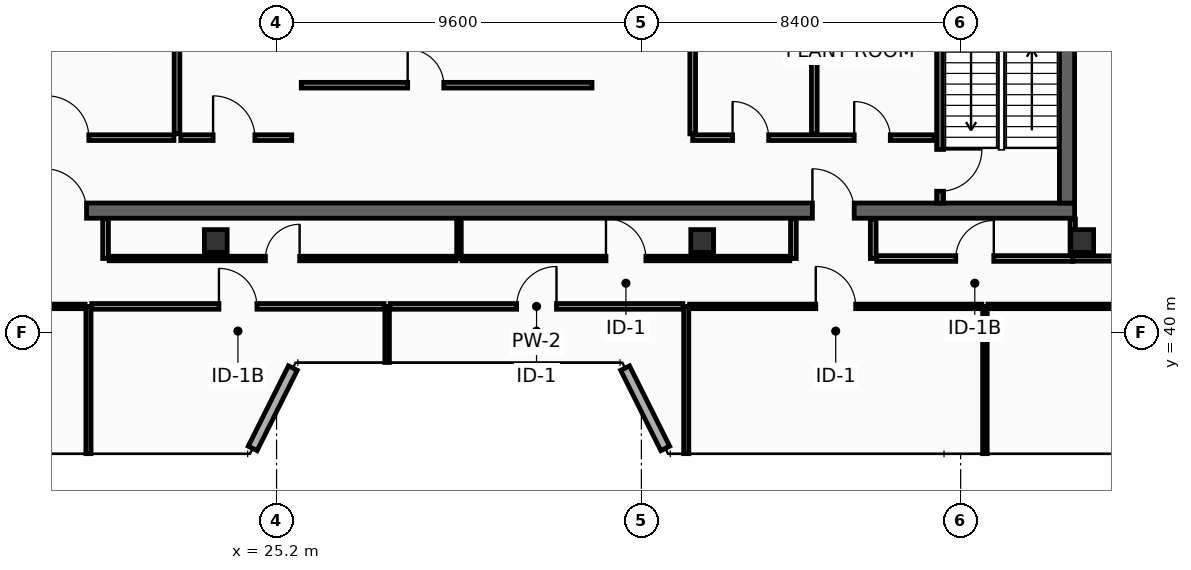
"""IFC4 building model, lengths in metres.
Left out: names, types, materials, properties, quantities, classifications, styles, units other than length and angle.
Written with IfcOpenShell. Run it as: python <this file> out.ifc"""

import sys

from ifc_helpers import new_model, si_unit, direction, frame, frame_2d, origin, origin_2d, place, context, subcontext, project, spatial, rectangle, hollow_rectangle, extrude, element, fill, save


model = new_model("IFC4")
c1 = context("Model", 3, precision=1e-05, world=origin(), true_north=direction((0.0, 1.0)))
c2 = subcontext(c1, "Body", "Model", "MODEL_VIEW")
j1 = project(units=[si_unit("LENGTHUNIT", "METRE"), si_unit("PLANEANGLEUNIT", "RADIAN")], contexts=[c1])
p1 = place(None, origin())
s1 = spatial("IfcSite", under=j1, at=p1, CompositionType="ELEMENT")
p2 = place(p1, origin())
s2 = spatial("IfcBuilding", under=s1, at=p2, CompositionType="ELEMENT")
p3 = place(p2, frame((0.0, 0.0, 319.2)))
s3 = spatial("IfcBuildingStorey", under=s2, at=p3, CompositionType="ELEMENT", Elevation=319.2)
p4 = place(p3, frame((13.7, 43.2, 0.0), z_axis=(0.0, 0.0, 1.0), x_axis=(1.0, 0.0, 0.0)))
e1 = element("IfcWall", 1, at=p4, inside=s3, PredefinedType="SHEAR", context=c2, shape_type="SweptSolid", body=[
    extrude(rectangle(XDim=32.5, YDim=0.4, at=frame_2d((16.25, 0.0))), origin(), (0.0, 0.0, 1.0), 3.95),
])
p5 = place(p4, frame((5.4, 0.0, 0.0)))
e2 = element("IfcOpeningElement", 2, at=p5, cuts=e1, PredefinedType="OPENING", context=c2, shape_type="SweptSolid", body=[
    extrude(rectangle(XDim=1.1, YDim=2.15, at=frame_2d((0.55, 1.075))), frame((0.0, 0.21, 0.0), z_axis=(0.0, -1.0, 0.0), x_axis=(1.0, 0.0, 0.0)), (0.0, 0.0, 1.0), 0.42),
])
p6 = place(p4, frame((25.6, 0.0, 0.0)))
e3 = element("IfcOpeningElement", 3, at=p6, cuts=e1, PredefinedType="OPENING", context=c2, shape_type="SweptSolid", body=[
    extrude(rectangle(XDim=1.1, YDim=2.15, at=frame_2d((0.55, 1.075))), frame((0.0, 0.21, 0.0), z_axis=(0.0, -1.0, 0.0), x_axis=(1.0, 0.0, 0.0)), (0.0, 0.0, 1.0), 0.42),
])
p7 = place(p3, frame((46.0, 43.4, 0.0), z_axis=(0.0, 0.0, 1.0), x_axis=(0.0, 1.0, 0.0)))
e4 = element("IfcWall", 4, at=p7, inside=s3, PredefinedType="SHEAR", context=c2, shape_type="SweptSolid", body=[
    extrude(rectangle(XDim=10.4, YDim=0.4, at=frame_2d((5.2, 0.0))), origin(), (0.0, 0.0, 1.0), 3.95),
])
for number, where, z_axis, x_axis in (
    (5, (23.6, 42.4, 0.0), (0.0, 0.0, 1.0), (1.0, 0.0, 0.0)),
    (6, (36.4, 42.4, 0.0), (0.0, 0.0, 1.0), (1.0, 0.0, 0.0)),
    (7, (46.4, 42.4, 0.0), (0.0, 0.0, 1.0), (1.0, 0.0, 0.0)),
):
    element("IfcColumn", number, at=place(p3, frame(where, z_axis=z_axis, x_axis=x_axis)), inside=s3, PredefinedType="COLUMN", context=c2, shape_type="SweptSolid", body=[
        extrude(hollow_rectangle(XDim=0.6, YDim=0.6, WallThickness=0.028, at=origin_2d()), origin(), (0.0, 0.0, 1.0), 4.2),
    ])
p8 = place(p3, frame((42.66, 53.8, 0.0), z_axis=(0.0, 0.0, 1.0), x_axis=(0.0, -1.0, 0.0)))
e8 = element("IfcWall", 8, at=p8, inside=s3, PredefinedType="SHEAR", context=c2, shape_type="SweptSolid", body=[
    extrude(rectangle(XDim=10.4, YDim=0.18, at=frame_2d((5.2, 0.0))), origin(), (0.0, 0.0, 1.0), 3.95),
])
p9 = place(p8, frame((8.99, 0.0, 0.0)))
e9 = element("IfcOpeningElement", 9, at=p9, cuts=e8, PredefinedType="OPENING", context=c2, shape_type="SweptSolid", body=[
    extrude(rectangle(XDim=1.1, YDim=2.15, at=frame_2d((0.55, 1.075))), frame((0.0, 0.1, 0.0), z_axis=(0.0, -1.0, 0.0), x_axis=(1.0, 0.0, 0.0)), (0.0, 0.0, 1.0), 0.2),
])
p10 = place(p3, frame((17.36, 45.12, 0.0), z_axis=(0.0, 0.0, 1.0), x_axis=(1.0, 0.0, 0.0)))
e10 = element("IfcWall", 10, at=p10, inside=s3, PredefinedType="PARTITIONING", context=c2, shape_type="SweptSolid", body=[
    extrude(rectangle(XDim=5.14, YDim=0.15, at=frame_2d((2.57, 0.0))), origin(), (0.0, 0.0, 1.0), 3.95),
])
p11 = place(p10, frame((1.8, 0.0, 0.0)))
e11 = element("IfcOpeningElement", 11, at=p11, cuts=e10, PredefinedType="OPENING", context=c2, shape_type="SweptSolid", body=[
    extrude(rectangle(XDim=1.1, YDim=2.15, at=frame_2d((0.55, 1.075))), frame((0.0, 0.085, 0.0), z_axis=(0.0, -1.0, 0.0), x_axis=(1.0, 0.0, 0.0)), (0.0, 0.0, 1.0), 0.17),
])
p12 = place(p3, frame((22.58, 50.55, 0.0), z_axis=(0.0, 0.0, 1.0), x_axis=(0.0, -1.0, 0.0)))
e12 = element("IfcWall", 12, at=p12, inside=s3, PredefinedType="PARTITIONING", context=c2, shape_type="SweptSolid", body=[
    extrude(rectangle(XDim=5.33, YDim=0.15, at=frame_2d((2.665, 0.0))), origin(), (0.0, 0.0, 1.0), 3.95),
])
p13 = place(p12, frame((1.8, 0.0, 0.0)))
e13 = element("IfcOpeningElement", 13, at=p13, cuts=e12, PredefinedType="OPENING", context=c2, shape_type="SweptSolid", body=[
    extrude(rectangle(XDim=1.1, YDim=2.15, at=frame_2d((0.55, 1.075))), frame((0.0, 0.085, 0.0), z_axis=(0.0, -1.0, 0.0), x_axis=(1.0, 0.0, 0.0)), (0.0, 0.0, 1.0), 0.17),
])
p14 = place(p3, frame((22.68, 45.12, 0.0), z_axis=(0.0, 0.0, 1.0), x_axis=(1.0, 0.0, 0.0)))
e14 = element("IfcWall", 14, at=p14, inside=s3, PredefinedType="PARTITIONING", context=c2, shape_type="SweptSolid", body=[
    extrude(rectangle(XDim=2.92, YDim=0.15, at=frame_2d((1.46, 0.0))), origin(), (0.0, 0.0, 1.0), 3.95),
])
p15 = place(p14, frame((0.85, 0.0, 0.0)))
e15 = element("IfcOpeningElement", 15, at=p15, cuts=e14, PredefinedType="OPENING", context=c2, shape_type="SweptSolid", body=[
    extrude(rectangle(XDim=1.1, YDim=2.15, at=frame_2d((0.55, 1.075))), frame((0.0, 0.085, 0.0), z_axis=(0.0, -1.0, 0.0), x_axis=(1.0, 0.0, 0.0)), (0.0, 0.0, 1.0), 0.17),
])
p16 = place(p3, frame((36.15, 45.12, 0.0), z_axis=(0.0, 0.0, 1.0), x_axis=(1.0, 0.0, 0.0)))
e16 = element("IfcWall", 16, at=p16, inside=s3, PredefinedType="PARTITIONING", context=c2, shape_type="SweptSolid", body=[
    extrude(rectangle(XDim=6.35, YDim=0.15, at=frame_2d((3.175, 0.0))), origin(), (0.0, 0.0, 1.0), 3.95),
])
p17 = place(p16, frame((1.05, 0.0, 0.0)))
e17 = element("IfcOpeningElement", 17, at=p17, cuts=e16, PredefinedType="OPENING", context=c2, shape_type="SweptSolid", body=[
    extrude(rectangle(XDim=0.95, YDim=2.15, at=frame_2d((0.475, 1.075))), frame((0.0, 0.085, 0.0), z_axis=(0.0, -1.0, 0.0), x_axis=(1.0, 0.0, 0.0)), (0.0, 0.0, 1.0), 0.17),
])
p18 = place(p16, frame((4.25, 0.0, 0.0)))
e18 = element("IfcOpeningElement", 18, at=p18, cuts=e16, PredefinedType="OPENING", context=c2, shape_type="SweptSolid", body=[
    extrude(rectangle(XDim=0.95, YDim=2.15, at=frame_2d((0.475, 1.075))), frame((0.0, 0.085, 0.0), z_axis=(0.0, -1.0, 0.0), x_axis=(1.0, 0.0, 0.0)), (0.0, 0.0, 1.0), 0.17),
])
for number, where, z_axis, x_axis in (
    (19, (36.15, 45.22, 0.0), (0.0, 0.0, 1.0), (0.0, 1.0, 0.0)),
    (20, (39.35, 45.22, 0.0), (0.0, 0.0, 1.0), (0.0, 1.0, 0.0)),
):
    element("IfcWall", number, at=place(p3, frame(where, z_axis=z_axis, x_axis=x_axis)), inside=s3, PredefinedType="PARTITIONING", context=c2, shape_type="SweptSolid", body=[
        extrude(rectangle(XDim=2.63, YDim=0.15, at=frame_2d((1.315, 0.0))), origin(), (0.0, 0.0, 1.0), 3.95),
    ])
p19 = place(p3, frame((25.85, 46.5, 0.0), z_axis=(0.0, 0.0, 1.0), x_axis=(1.0, 0.0, 0.0)))
e21 = element("IfcWall", 21, at=p19, inside=s3, PredefinedType="PARTITIONING", context=c2, shape_type="SweptSolid", body=[
    extrude(rectangle(XDim=7.65, YDim=0.15, at=frame_2d((3.825, 0.0))), origin(), (0.0, 0.0, 1.0), 3.95),
])
p20 = place(p19, frame((2.8, 0.0, 0.0)))
e22 = element("IfcOpeningElement", 22, at=p20, cuts=e21, PredefinedType="OPENING", context=c2, shape_type="SweptSolid", body=[
    extrude(rectangle(XDim=0.95, YDim=2.15, at=frame_2d((0.475, 1.075))), frame((0.0, 0.085, 0.0), z_axis=(0.0, -1.0, 0.0), x_axis=(1.0, 0.0, 0.0)), (0.0, 0.0, 1.0), 0.17),
])
for number, where, z_axis, x_axis in (
    (23, (24.572, 36.943, 0.0), (0.0, 0.0, 1.0), (0.447, 0.894, 0.0)),
    (24, (34.372, 39.057, 0.0), (0.0, 0.0, 1.0), (0.447, -0.894, 0.0)),
):
    element("IfcWall", number, at=place(p3, frame(where, z_axis=z_axis, x_axis=x_axis)), inside=s3, PredefinedType="STANDARD", context=c2, shape_type="SweptSolid", body=[
        extrude(rectangle(XDim=2.363, YDim=0.26, at=frame_2d((1.182, 0.0))), origin(), (0.0, 0.0, 1.0), 3.95),
    ])
p21 = place(p3, frame((46.15, 41.94, 0.0), z_axis=(0.0, 0.0, 1.0), x_axis=(1.0, 0.0, 0.0)))
e25 = element("IfcWall", 25, at=p21, inside=s3, PredefinedType="PARTITIONING", context=c2, shape_type="SweptSolid", body=[
    extrude(rectangle(XDim=4.05, YDim=0.14, at=frame_2d((2.025, 0.0))), origin(), (0.0, 0.0, 1.0), 3.95),
])
p22 = place(p3, frame((46.15, 42.03, 0.0), z_axis=(0.0, 0.0, 1.0), x_axis=(0.0, 1.0, 0.0)))
e26 = element("IfcWall", 26, at=p22, inside=s3, PredefinedType="PARTITIONING", context=c2, shape_type="SweptSolid", body=[
    extrude(rectangle(XDim=0.95, YDim=0.14, at=frame_2d((0.475, 0.0))), origin(), (0.0, 0.0, 1.0), 3.95),
])
for number, where, z_axis, x_axis in (
    (27, (20.7, 41.94, 0.0), (0.0, 0.0, 1.0), (0.0, 1.0, 0.0)),
    (28, (38.8, 41.94, 0.0), (0.0, 0.0, 1.0), (0.0, 1.0, 0.0)),
    (29, (40.9, 41.94, 0.0), (0.0, 0.0, 1.0), (0.0, 1.0, 0.0)),
):
    element("IfcWall", number, at=place(p3, frame(where, z_axis=z_axis, x_axis=x_axis)), inside=s3, PredefinedType="PARTITIONING", context=c2, shape_type="SweptSolid", body=[
        extrude(rectangle(XDim=1.04, YDim=0.15, at=frame_2d((0.52, 0.0))), origin(), (0.0, 0.0, 1.0), 3.95),
    ])
p23 = place(p3, frame((30.0, 41.94, 0.0), z_axis=(0.0, 0.0, 1.0), x_axis=(0.0, 1.0, 0.0)))
e30 = element("IfcWall", 30, at=p23, inside=s3, PredefinedType="PARTITIONING", context=c2, shape_type="SweptSolid", body=[
    extrude(rectangle(XDim=1.04, YDim=0.12, at=frame_2d((0.52, 0.0))), origin(), (0.0, 0.0, 1.0), 3.347),
])
p24 = place(p3, frame((20.795, 41.94, 0.0), z_axis=(0.0, 0.0, 1.0), x_axis=(1.0, 0.0, 0.0)))
e31 = element("IfcWall", 31, at=p24, inside=s3, PredefinedType="PARTITIONING", context=c2, shape_type="SweptSolid", body=[
    extrude(rectangle(XDim=9.125, YDim=0.12, at=frame_2d((4.562, 0.0))), origin(), (0.0, 0.0, 1.0), 3.95),
])
p25 = place(p24, frame((4.112, 0.0, 0.0)))
e32 = element("IfcOpeningElement", 32, at=p25, cuts=e31, PredefinedType="OPENING", context=c2, shape_type="SweptSolid", body=[
    extrude(rectangle(XDim=0.9, YDim=2.1, at=frame_2d((0.45, 1.05))), frame((0.0, 0.07, 0.0), z_axis=(0.0, -1.0, 0.0), x_axis=(1.0, 0.0, 0.0)), (0.0, 0.0, 1.0), 0.14),
])
p26 = place(p3, frame((30.08, 41.94, 0.0), z_axis=(0.0, 0.0, 1.0), x_axis=(1.0, 0.0, 0.0)))
e33 = element("IfcWall", 33, at=p26, inside=s3, PredefinedType="PARTITIONING", context=c2, shape_type="SweptSolid", body=[
    extrude(rectangle(XDim=8.625, YDim=0.12, at=frame_2d((4.312, 0.0))), origin(), (0.0, 0.0, 1.0), 3.95),
])
p27 = place(p26, frame((3.788, 0.0, 0.0)))
e34 = element("IfcOpeningElement", 34, at=p27, cuts=e33, PredefinedType="OPENING", context=c2, shape_type="SweptSolid", body=[
    extrude(rectangle(XDim=1.05, YDim=2.15, at=frame_2d((0.525, 1.075))), frame((0.0, 0.07, 0.0), z_axis=(0.0, -1.0, 0.0), x_axis=(1.0, 0.0, 0.0)), (0.0, 0.0, 1.0), 0.14),
])
p28 = place(p3, frame((40.995, 41.94, 0.0), z_axis=(0.0, 0.0, 1.0), x_axis=(1.0, 0.0, 0.0)))
e35 = element("IfcWall", 35, at=p28, inside=s3, PredefinedType="PARTITIONING", context=c2, shape_type="SweptSolid", body=[
    extrude(rectangle(XDim=5.155, YDim=0.15, at=frame_2d((2.577, 0.0))), origin(), (0.0, 0.0, 1.0), 3.95),
])
p29 = place(p28, frame((2.078, 0.0, 0.0)))
e36 = element("IfcOpeningElement", 36, at=p29, cuts=e35, PredefinedType="OPENING", context=c2, shape_type="SweptSolid", body=[
    extrude(rectangle(XDim=1.0, YDim=2.15, at=frame_2d((0.5, 1.075))), frame((0.0, 0.085, 0.0), z_axis=(0.0, -1.0, 0.0), x_axis=(1.0, 0.0, 0.0)), (0.0, 0.0, 1.0), 0.17),
])
p30 = place(p3, frame((20.25, 36.805, 0.0), z_axis=(0.0, 0.0, 1.0), x_axis=(0.0, 1.0, 0.0)))
e37 = element("IfcWall", 37, at=p30, inside=s3, PredefinedType="PARTITIONING", context=c2, shape_type="SweptSolid", body=[
    extrude(rectangle(XDim=3.875, YDim=0.135, at=frame_2d((1.938, 0.0))), origin(), (0.0, 0.0, 1.0), 3.95),
])
p31 = place(p3, frame((28.11, 39.205, 0.0), z_axis=(0.0, 0.0, 1.0), x_axis=(0.0, 1.0, 0.0)))
e38 = element("IfcWall", 38, at=p31, inside=s3, PredefinedType="PARTITIONING", context=c2, shape_type="SweptSolid", body=[
    extrude(rectangle(XDim=1.475, YDim=0.12, at=frame_2d((0.737, 0.0))), origin(), (0.0, 0.0, 1.0), 3.95),
])
p32 = place(p3, frame((35.98, 36.805, 0.0), z_axis=(0.0, 0.0, 1.0), x_axis=(0.0, 1.0, 0.0)))
e39 = element("IfcWall", 39, at=p32, inside=s3, PredefinedType="PARTITIONING", context=c2, shape_type="SweptSolid", body=[
    extrude(rectangle(XDim=3.875, YDim=0.135, at=frame_2d((1.938, 0.0))), origin(), (0.0, 0.0, 1.0), 3.95),
])
p33 = place(p3, frame((43.84, 36.805, 0.0), z_axis=(0.0, 0.0, 1.0), x_axis=(0.0, 1.0, 0.0)))
e40 = element("IfcWall", 40, at=p33, inside=s3, PredefinedType="PARTITIONING", context=c2, shape_type="SweptSolid", body=[
    extrude(rectangle(XDim=3.875, YDim=0.12, at=frame_2d((1.938, 0.0))), origin(), (0.0, 0.0, 1.0), 3.95),
])
p34 = place(p3, frame((13.57, 40.68, 0.0), z_axis=(0.0, 0.0, 1.0), x_axis=(1.0, 0.0, 0.0)))
e41 = element("IfcWall", 41, at=p34, inside=s3, PredefinedType="PARTITIONING", context=c2, shape_type="SweptSolid", body=[
    extrude(rectangle(XDim=6.593, YDim=0.12, at=frame_2d((3.296, 0.0))), origin(), (0.0, 0.0, 1.0), 3.95),
])
p35 = place(p34, frame((2.846, 0.0, 0.0)))
e42 = element("IfcOpeningElement", 42, at=p35, cuts=e41, PredefinedType="OPENING", context=c2, shape_type="SweptSolid", body=[
    extrude(rectangle(XDim=0.9, YDim=2.1, at=frame_2d((0.45, 1.05))), frame((0.0, 0.07, 0.0), z_axis=(0.0, -1.0, 0.0), x_axis=(1.0, 0.0, 0.0)), (0.0, 0.0, 1.0), 0.14),
])
p36 = place(p3, frame((20.337, 40.68, 0.0), z_axis=(0.0, 0.0, 1.0), x_axis=(1.0, 0.0, 0.0)))
e43 = element("IfcWall", 43, at=p36, inside=s3, PredefinedType="PARTITIONING", context=c2, shape_type="SweptSolid", body=[
    extrude(rectangle(XDim=7.693, YDim=0.15, at=frame_2d((3.846, 0.0))), origin(), (0.0, 0.0, 1.0), 3.95),
])
p37 = place(p36, frame((3.346, 0.0, 0.0)))
e44 = element("IfcOpeningElement", 44, at=p37, cuts=e43, PredefinedType="OPENING", context=c2, shape_type="SweptSolid", body=[
    extrude(rectangle(XDim=1.0, YDim=2.15, at=frame_2d((0.5, 1.075))), frame((0.0, 0.085, 0.0), z_axis=(0.0, -1.0, 0.0), x_axis=(1.0, 0.0, 0.0)), (0.0, 0.0, 1.0), 0.17),
])
p38 = place(p3, frame((28.19, 40.68, 0.0), z_axis=(0.0, 0.0, 1.0), x_axis=(1.0, 0.0, 0.0)))
e45 = element("IfcWall", 45, at=p38, inside=s3, PredefinedType="PARTITIONING", context=c2, shape_type="SweptSolid", body=[
    extrude(rectangle(XDim=7.703, YDim=0.15, at=frame_2d((3.851, 0.0))), origin(), (0.0, 0.0, 1.0), 3.95),
])
p39 = place(p38, frame((3.326, 0.0, 0.0)))
e46 = element("IfcOpeningElement", 46, at=p39, cuts=e45, PredefinedType="OPENING", context=c2, shape_type="SweptSolid", body=[
    extrude(rectangle(XDim=1.05, YDim=2.15, at=frame_2d((0.525, 1.075))), frame((0.0, 0.085, 0.0), z_axis=(0.0, -1.0, 0.0), x_axis=(1.0, 0.0, 0.0)), (0.0, 0.0, 1.0), 0.17),
])
p40 = place(p3, frame((36.067, 40.68, 0.0), z_axis=(0.0, 0.0, 1.0), x_axis=(1.0, 0.0, 0.0)))
e47 = element("IfcWall", 47, at=p40, inside=s3, PredefinedType="PARTITIONING", context=c2, shape_type="SweptSolid", body=[
    extrude(rectangle(XDim=7.693, YDim=0.12, at=frame_2d((3.846, 0.0))), origin(), (0.0, 0.0, 1.0), 3.95),
])
p41 = place(p40, frame((3.321, 0.0, 0.0)))
e48 = element("IfcOpeningElement", 48, at=p41, cuts=e47, PredefinedType="OPENING", context=c2, shape_type="SweptSolid", body=[
    extrude(rectangle(XDim=1.05, YDim=2.15, at=frame_2d((0.525, 1.075))), frame((0.0, 0.07, 0.0), z_axis=(0.0, -1.0, 0.0), x_axis=(1.0, 0.0, 0.0)), (0.0, 0.0, 1.0), 0.14),
])
p42 = place(p3, frame((43.92, 40.68, 0.0), z_axis=(0.0, 0.0, 1.0), x_axis=(1.0, 0.0, 0.0)))
e49 = element("IfcWall", 49, at=p42, inside=s3, PredefinedType="PARTITIONING", context=c2, shape_type="SweptSolid", body=[
    extrude(rectangle(XDim=9.449, YDim=0.12, at=frame_2d((4.725, 0.0))), origin(), (0.0, 0.0, 1.0), 3.485),
])
p43 = place(p42, frame((4.224, 0.0, 0.0)))
e50 = element("IfcOpeningElement", 50, at=p43, cuts=e49, PredefinedType="OPENING", context=c2, shape_type="SweptSolid", body=[
    extrude(rectangle(XDim=1.0, YDim=2.15, at=frame_2d((0.5, 1.075))), frame((0.0, 0.07, 0.0), z_axis=(0.0, -1.0, 0.0), x_axis=(1.0, 0.0, 0.0)), (0.0, 0.0, 1.0), 0.14),
])
p44 = place(p9, origin())
e51 = element("IfcDoor", 51, at=p44, inside=s3, OperationType="SINGLE_SWING_LEFT", PredefinedType="DOOR", context=c2, shape_type="SweptSolid", body=[
    extrude(rectangle(XDim=1.1, YDim=2.15, at=frame_2d((0.55, 1.075))), frame((0.0, 0.025, 0.0), z_axis=(0.0, -1.0, 0.0), x_axis=(1.0, 0.0, 0.0)), (0.0, 0.0, 1.0), 0.05),
])
fill(e9, e51)
p45 = place(p11, origin())
e52 = element("IfcDoor", 52, at=p45, inside=s3, OperationType="SINGLE_SWING_LEFT", PredefinedType="DOOR", context=c2, shape_type="SweptSolid", body=[
    extrude(rectangle(XDim=1.1, YDim=2.15, at=frame_2d((0.55, 1.075))), frame((0.0, 0.025, 0.0), z_axis=(0.0, -1.0, 0.0), x_axis=(1.0, 0.0, 0.0)), (0.0, 0.0, 1.0), 0.05),
])
fill(e11, e52)
p46 = place(p15, origin())
e53 = element("IfcDoor", 53, at=p46, inside=s3, OperationType="SINGLE_SWING_LEFT", PredefinedType="DOOR", context=c2, shape_type="SweptSolid", body=[
    extrude(rectangle(XDim=1.1, YDim=2.15, at=frame_2d((0.55, 1.075))), frame((0.0, 0.025, 0.0), z_axis=(0.0, -1.0, 0.0), x_axis=(1.0, 0.0, 0.0)), (0.0, 0.0, 1.0), 0.05),
])
fill(e15, e53)
p47 = place(p5, origin())
e54 = element("IfcDoor", 54, at=p47, inside=s3, OperationType="SINGLE_SWING_LEFT", PredefinedType="DOOR", context=c2, shape_type="SweptSolid", body=[
    extrude(rectangle(XDim=1.1, YDim=2.15, at=frame_2d((0.55, 1.075))), frame((0.0, 0.025, 0.0), z_axis=(0.0, -1.0, 0.0), x_axis=(1.0, 0.0, 0.0)), (0.0, 0.0, 1.0), 0.05),
])
fill(e2, e54)
p48 = place(p6, origin())
e55 = element("IfcDoor", 55, at=p48, inside=s3, OperationType="SINGLE_SWING_LEFT", PredefinedType="DOOR", context=c2, shape_type="SweptSolid", body=[
    extrude(rectangle(XDim=1.1, YDim=2.15, at=frame_2d((0.55, 1.075))), frame((0.0, 0.025, 0.0), z_axis=(0.0, -1.0, 0.0), x_axis=(1.0, 0.0, 0.0)), (0.0, 0.0, 1.0), 0.05),
])
fill(e3, e55)
p49 = place(p17, origin())
e56 = element("IfcDoor", 56, at=p49, inside=s3, OperationType="SINGLE_SWING_LEFT", PredefinedType="DOOR", context=c2, shape_type="SweptSolid", body=[
    extrude(rectangle(XDim=0.95, YDim=2.15, at=frame_2d((0.475, 1.075))), frame((0.0, 0.025, 0.0), z_axis=(0.0, -1.0, 0.0), x_axis=(1.0, 0.0, 0.0)), (0.0, 0.0, 1.0), 0.05),
])
fill(e17, e56)
p50 = place(p18, origin())
e57 = element("IfcDoor", 57, at=p50, inside=s3, OperationType="SINGLE_SWING_LEFT", PredefinedType="DOOR", context=c2, shape_type="SweptSolid", body=[
    extrude(rectangle(XDim=0.95, YDim=2.15, at=frame_2d((0.475, 1.075))), frame((0.0, 0.025, 0.0), z_axis=(0.0, -1.0, 0.0), x_axis=(1.0, 0.0, 0.0)), (0.0, 0.0, 1.0), 0.05),
])
fill(e18, e57)
p51 = place(p20, origin())
e58 = element("IfcDoor", 58, at=p51, inside=s3, OperationType="SINGLE_SWING_LEFT", PredefinedType="DOOR", context=c2, shape_type="SweptSolid", body=[
    extrude(rectangle(XDim=0.95, YDim=2.15, at=frame_2d((0.475, 1.075))), frame((0.0, 0.025, 0.0), z_axis=(0.0, -1.0, 0.0), x_axis=(1.0, 0.0, 0.0)), (0.0, 0.0, 1.0), 0.05),
])
fill(e22, e58)
p52 = place(p25, origin())
e59 = element("IfcDoor", 59, at=p52, inside=s3, OperationType="SINGLE_SWING_RIGHT", PredefinedType="DOOR", context=c2, shape_type="SweptSolid", body=[
    extrude(rectangle(XDim=0.9, YDim=2.1, at=frame_2d((0.45, 1.05))), frame((0.0, 0.025, 0.0), z_axis=(0.0, -1.0, 0.0), x_axis=(1.0, 0.0, 0.0)), (0.0, 0.0, 1.0), 0.05),
])
fill(e32, e59)
p53 = place(p27, origin())
e60 = element("IfcDoor", 60, at=p53, inside=s3, OperationType="SINGLE_SWING_LEFT", PredefinedType="DOOR", context=c2, shape_type="SweptSolid", body=[
    extrude(rectangle(XDim=1.05, YDim=2.15, at=frame_2d((0.525, 1.075))), frame((0.0, 0.025, 0.0), z_axis=(0.0, -1.0, 0.0), x_axis=(1.0, 0.0, 0.0)), (0.0, 0.0, 1.0), 0.05),
])
fill(e34, e60)
p54 = place(p29, origin())
e61 = element("IfcDoor", 61, at=p54, inside=s3, OperationType="SINGLE_SWING_RIGHT", PredefinedType="DOOR", context=c2, shape_type="SweptSolid", body=[
    extrude(rectangle(XDim=1.0, YDim=2.15, at=frame_2d((0.5, 1.075))), frame((0.0, 0.025, 0.0), z_axis=(0.0, -1.0, 0.0), x_axis=(1.0, 0.0, 0.0)), (0.0, 0.0, 1.0), 0.05),
])
fill(e36, e61)
p55 = place(p37, origin())
e62 = element("IfcDoor", 62, at=p55, inside=s3, OperationType="SINGLE_SWING_LEFT", PredefinedType="DOOR", context=c2, shape_type="SweptSolid", body=[
    extrude(rectangle(XDim=1.0, YDim=2.15, at=frame_2d((0.5, 1.075))), frame((0.0, 0.025, 0.0), z_axis=(0.0, -1.0, 0.0), x_axis=(1.0, 0.0, 0.0)), (0.0, 0.0, 1.0), 0.05),
])
fill(e44, e62)
p56 = place(p39, origin())
e63 = element("IfcDoor", 63, at=p56, inside=s3, OperationType="SINGLE_SWING_RIGHT", PredefinedType="DOOR", context=c2, shape_type="SweptSolid", body=[
    extrude(rectangle(XDim=1.05, YDim=2.15, at=frame_2d((0.525, 1.075))), frame((0.0, 0.025, 0.0), z_axis=(0.0, -1.0, 0.0), x_axis=(1.0, 0.0, 0.0)), (0.0, 0.0, 1.0), 0.05),
])
fill(e46, e63)
p57 = place(p41, origin())
e64 = element("IfcDoor", 64, at=p57, inside=s3, OperationType="SINGLE_SWING_LEFT", PredefinedType="DOOR", context=c2, shape_type="SweptSolid", body=[
    extrude(rectangle(XDim=1.05, YDim=2.15, at=frame_2d((0.525, 1.075))), frame((0.0, 0.025, 0.0), z_axis=(0.0, -1.0, 0.0), x_axis=(1.0, 0.0, 0.0)), (0.0, 0.0, 1.0), 0.05),
])
fill(e48, e64)
save(model, sys.argv[1])
